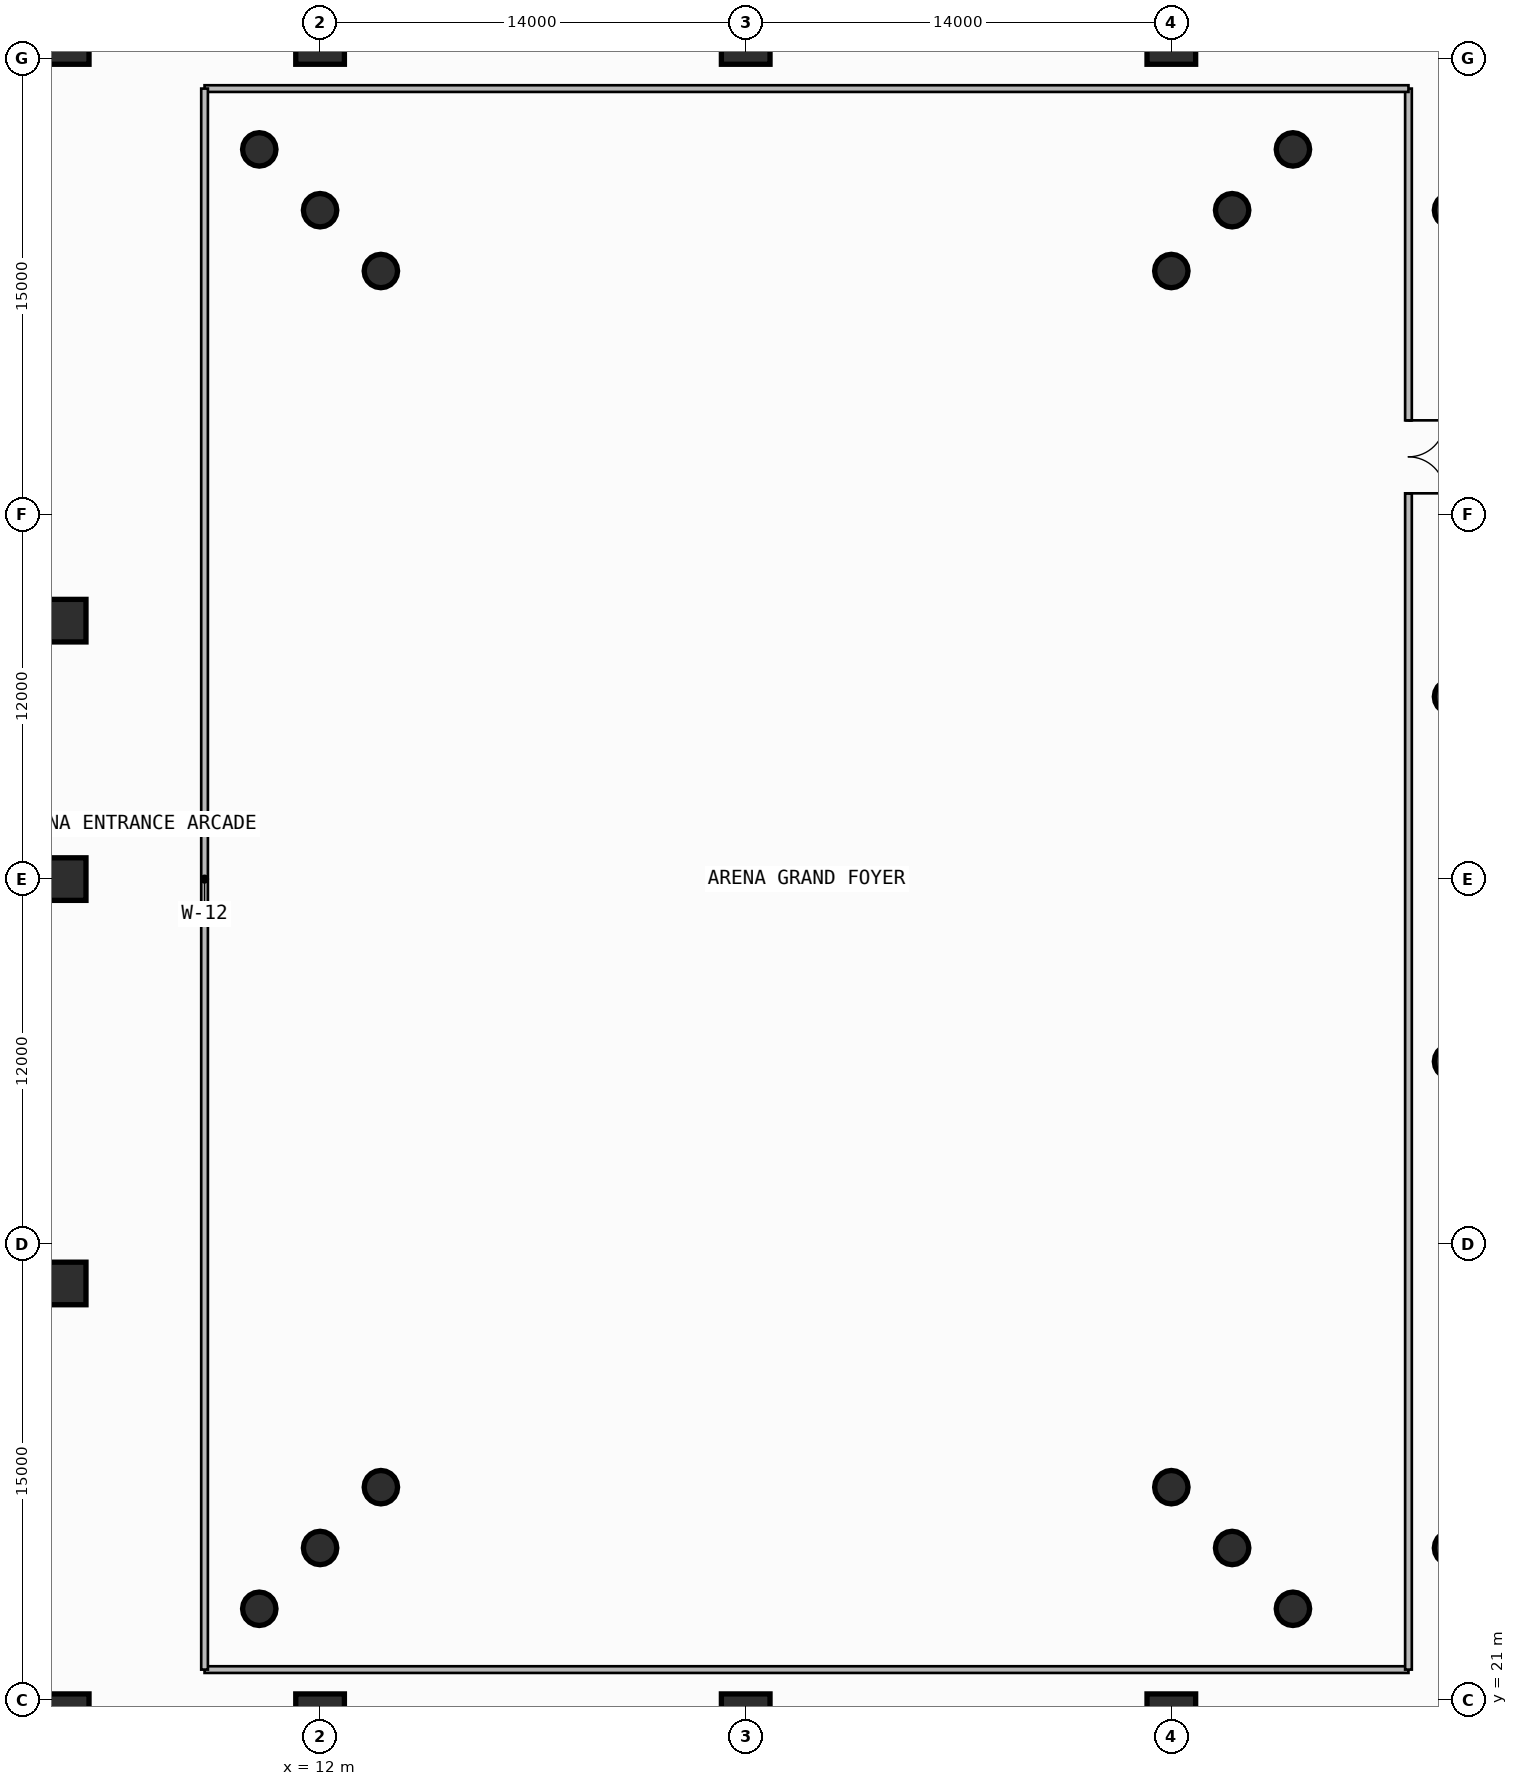
"""IFC4 building model, lengths in metres.
Left out: names, types, materials, properties, quantities, classifications, styles, units other than length and angle.
Written with IfcOpenShell. Run it as: python <this file> out.ifc"""

import sys

from ifc_helpers import new_model, si_unit, direction, frame, frame_2d, origin, origin_2d, place, context, subcontext, project, spatial, rectangle, circle, extrude, element, fill, save


model = new_model("IFC4")
c1 = context("Model", 3, precision=1e-05, world=origin(), true_north=direction((0.0, 1.0)))
c2 = subcontext(c1, "Body", "Model", "MODEL_VIEW")
j1 = project(units=[si_unit("LENGTHUNIT", "METRE"), si_unit("PLANEANGLEUNIT", "RADIAN")], contexts=[c1])
p1 = place(None, origin())
s1 = spatial("IfcSite", under=j1, at=p1, CompositionType="ELEMENT")
p2 = place(p1, origin())
s2 = spatial("IfcBuilding", under=s1, at=p2, CompositionType="ELEMENT")
p3 = place(p2, origin())
s3 = spatial("IfcBuildingStorey", under=s2, at=p3, CompositionType="ELEMENT", Elevation=0.0)
p4 = place(p3, frame((3.6, 20.4, 0.0), z_axis=(0.0, 0.0, 1.0), x_axis=(1.0, 0.0, 0.0)))
e1 = element("IfcColumn", 1, at=p4, inside=s3, PredefinedType="COLUMN", context=c2, shape_type="SweptSolid", body=[
    extrude(rectangle(XDim=1.6, YDim=1.6, at=origin_2d()), origin(), (0.0, 0.0, 1.0), 4.5),
])
for number, where, z_axis, x_axis in (
    (2, (3.6, 34.7, 0.0), (0.0, 0.0, 1.0), (1.0, 0.0, 0.0)),
    (3, (3.6, 48.0, 0.0), (0.0, 0.0, 1.0), (1.0, 0.0, 0.0)),
    (4, (3.6, 56.5, 0.0), (0.0, 0.0, 1.0), (1.0, 0.0, 0.0)),
):
    element("IfcColumn", number, at=place(p3, frame(where, z_axis=z_axis, x_axis=x_axis)), inside=s3, PredefinedType="COLUMN", context=c2, shape_type="SweptSolid", body=[
        extrude(rectangle(XDim=1.4, YDim=1.4, at=origin_2d()), origin(), (0.0, 0.0, 1.0), 4.5),
    ])
for number, where, z_axis, x_axis in (
    (5, (3.6, 75.6, 0.0), (0.0, 0.0, 1.0), (1.0, 0.0, 0.0)),
    (6, (12.0, 20.4, 0.0), (0.0, 0.0, 1.0), (1.0, 0.0, 0.0)),
    (7, (12.0, 75.6, 0.0), (0.0, 0.0, 1.0), (1.0, 0.0, 0.0)),
    (8, (26.0, 20.4, 0.0), (0.0, 0.0, 1.0), (1.0, 0.0, 0.0)),
    (9, (26.0, 75.6, 0.0), (0.0, 0.0, 1.0), (1.0, 0.0, 0.0)),
    (10, (40.0, 20.4, 0.0), (0.0, 0.0, 1.0), (1.0, 0.0, 0.0)),
    (11, (40.0, 75.6, 0.0), (0.0, 0.0, 1.0), (1.0, 0.0, 0.0)),
):
    element("IfcColumn", number, at=place(p3, frame(where, z_axis=z_axis, x_axis=x_axis)), inside=s3, PredefinedType="COLUMN", context=c2, shape_type="SweptSolid", body=[
        extrude(rectangle(XDim=1.6, YDim=1.6, at=origin_2d()), origin(), (0.0, 0.0, 1.0), 4.5),
    ])
for number, where, z_axis, x_axis in (
    (12, (14.0, 28.0, 0.0), (0.0, 0.0, 1.0), (1.0, 0.0, 0.0)),
    (13, (40.0, 28.0, 0.0), (0.0, 0.0, 1.0), (1.0, 0.0, 0.0)),
    (14, (40.0, 68.0, 0.0), (0.0, 0.0, 1.0), (1.0, 0.0, 0.0)),
    (15, (14.0, 68.0, 0.0), (0.0, 0.0, 1.0), (1.0, 0.0, 0.0)),
):
    element("IfcColumn", number, at=place(p3, frame(where, z_axis=z_axis, x_axis=x_axis)), inside=s3, PredefinedType="PILASTER", context=c2, shape_type="SweptSolid", body=[
        extrude(circle(Radius=0.55, at=origin_2d()), origin(), (0.0, 0.0, 1.0), 4.22),
    ])
for number, where, z_axis, x_axis in (
    (16, (12.0, 26.0, 0.0), (0.0, 0.0, 1.0), (1.0, 0.0, 0.0)),
    (17, (42.0, 26.0, 0.0), (0.0, 0.0, 1.0), (1.0, 0.0, 0.0)),
    (18, (42.0, 70.0, 0.0), (0.0, 0.0, 1.0), (1.0, 0.0, 0.0)),
    (19, (12.0, 70.0, 0.0), (0.0, 0.0, 1.0), (1.0, 0.0, 0.0)),
    (20, (10.0, 24.0, 0.0), (0.0, 0.0, 1.0), (1.0, 0.0, 0.0)),
    (21, (44.0, 24.0, 0.0), (0.0, 0.0, 1.0), (1.0, 0.0, 0.0)),
    (22, (44.0, 72.0, 0.0), (0.0, 0.0, 1.0), (1.0, 0.0, 0.0)),
    (23, (10.0, 72.0, 0.0), (0.0, 0.0, 1.0), (1.0, 0.0, 0.0)),
    (24, (49.2, 26.0, 0.0), (0.0, 0.0, 1.0), (1.0, 0.0, 0.0)),
    (25, (49.2, 42.0, 0.0), (0.0, 0.0, 1.0), (1.0, 0.0, 0.0)),
    (26, (49.2, 54.0, 0.0), (0.0, 0.0, 1.0), (1.0, 0.0, 0.0)),
    (27, (49.2, 70.0, 0.0), (0.0, 0.0, 1.0), (1.0, 0.0, 0.0)),
):
    element("IfcColumn", number, at=place(p3, frame(where, z_axis=z_axis, x_axis=x_axis)), inside=s3, PredefinedType="PILASTER", context=c2, shape_type="SweptSolid", body=[
        extrude(circle(Radius=0.55, at=origin_2d()), origin(), (0.0, 0.0, 1.0), 4.5),
    ])
p5 = place(p3, frame((8.2, 22.0, 0.0), z_axis=(0.0, 0.0, 1.0), x_axis=(1.0, 0.0, 0.0)))
e28 = element("IfcWall", 28, at=p5, inside=s3, PredefinedType="SOLIDWALL", context=c2, shape_type="SweptSolid", body=[
    extrude(rectangle(XDim=39.6, YDim=0.22, at=frame_2d((19.8, 0.0))), origin(), (0.0, 0.0, 1.0), 4.18),
])
p6 = place(p3, frame((47.8, 22.0, 0.0), z_axis=(0.0, 0.0, 1.0), x_axis=(0.0, 1.0, 0.0)))
e29 = element("IfcWall", 29, at=p6, inside=s3, PredefinedType="SOLIDWALL", context=c2, shape_type="SweptSolid", body=[
    extrude(rectangle(XDim=52.0, YDim=0.22, at=frame_2d((26.0, 0.0))), origin(), (0.0, 0.0, 1.0), 4.18),
])
p7 = place(p6, frame((38.688, 0.0, 0.0)))
e30 = element("IfcOpeningElement", 30, at=p7, cuts=e29, PredefinedType="OPENING", context=c2, shape_type="SweptSolid", body=[
    extrude(rectangle(XDim=2.4, YDim=2.4, at=frame_2d((1.2, 1.2))), frame((0.0, 0.12, 0.0), z_axis=(0.0, -1.0, 0.0), x_axis=(1.0, 0.0, 0.0)), (0.0, 0.0, 1.0), 0.24),
])
p8 = place(p3, frame((47.8, 74.0, 0.0), z_axis=(0.0, 0.0, 1.0), x_axis=(-1.0, 0.0, 0.0)))
e31 = element("IfcWall", 31, at=p8, inside=s3, PredefinedType="SOLIDWALL", context=c2, shape_type="SweptSolid", body=[
    extrude(rectangle(XDim=39.6, YDim=0.22, at=frame_2d((19.8, 0.0))), origin(), (0.0, 0.0, 1.0), 4.18),
])
p9 = place(p3, frame((8.2, 74.0, 0.0), z_axis=(0.0, 0.0, 1.0), x_axis=(0.0, -1.0, 0.0)))
e32 = element("IfcWall", 32, at=p9, inside=s3, PredefinedType="SOLIDWALL", context=c2, shape_type="SweptSolid", body=[
    extrude(rectangle(XDim=52.0, YDim=0.22, at=frame_2d((26.0, 0.0))), origin(), (0.0, 0.0, 1.0), 4.18),
])
p10 = place(p7, frame((2.4, 0.0, 0.0), z_axis=(0.0, 0.0, 1.0), x_axis=(-1.0, 0.0, 0.0)))
e33 = element("IfcDoor", 33, at=p10, inside=s3, OperationType="DOUBLE_DOOR_SINGLE_SWING", PredefinedType="USERDEFINED", context=c2, shape_type="SweptSolid", body=[
    extrude(rectangle(XDim=2.4, YDim=2.4, at=frame_2d((1.2, 1.2))), frame((0.0, 0.025, 0.0), z_axis=(0.0, -1.0, 0.0), x_axis=(1.0, 0.0, 0.0)), (0.0, 0.0, 1.0), 0.05),
])
fill(e30, e33)
save(model, sys.argv[1])
